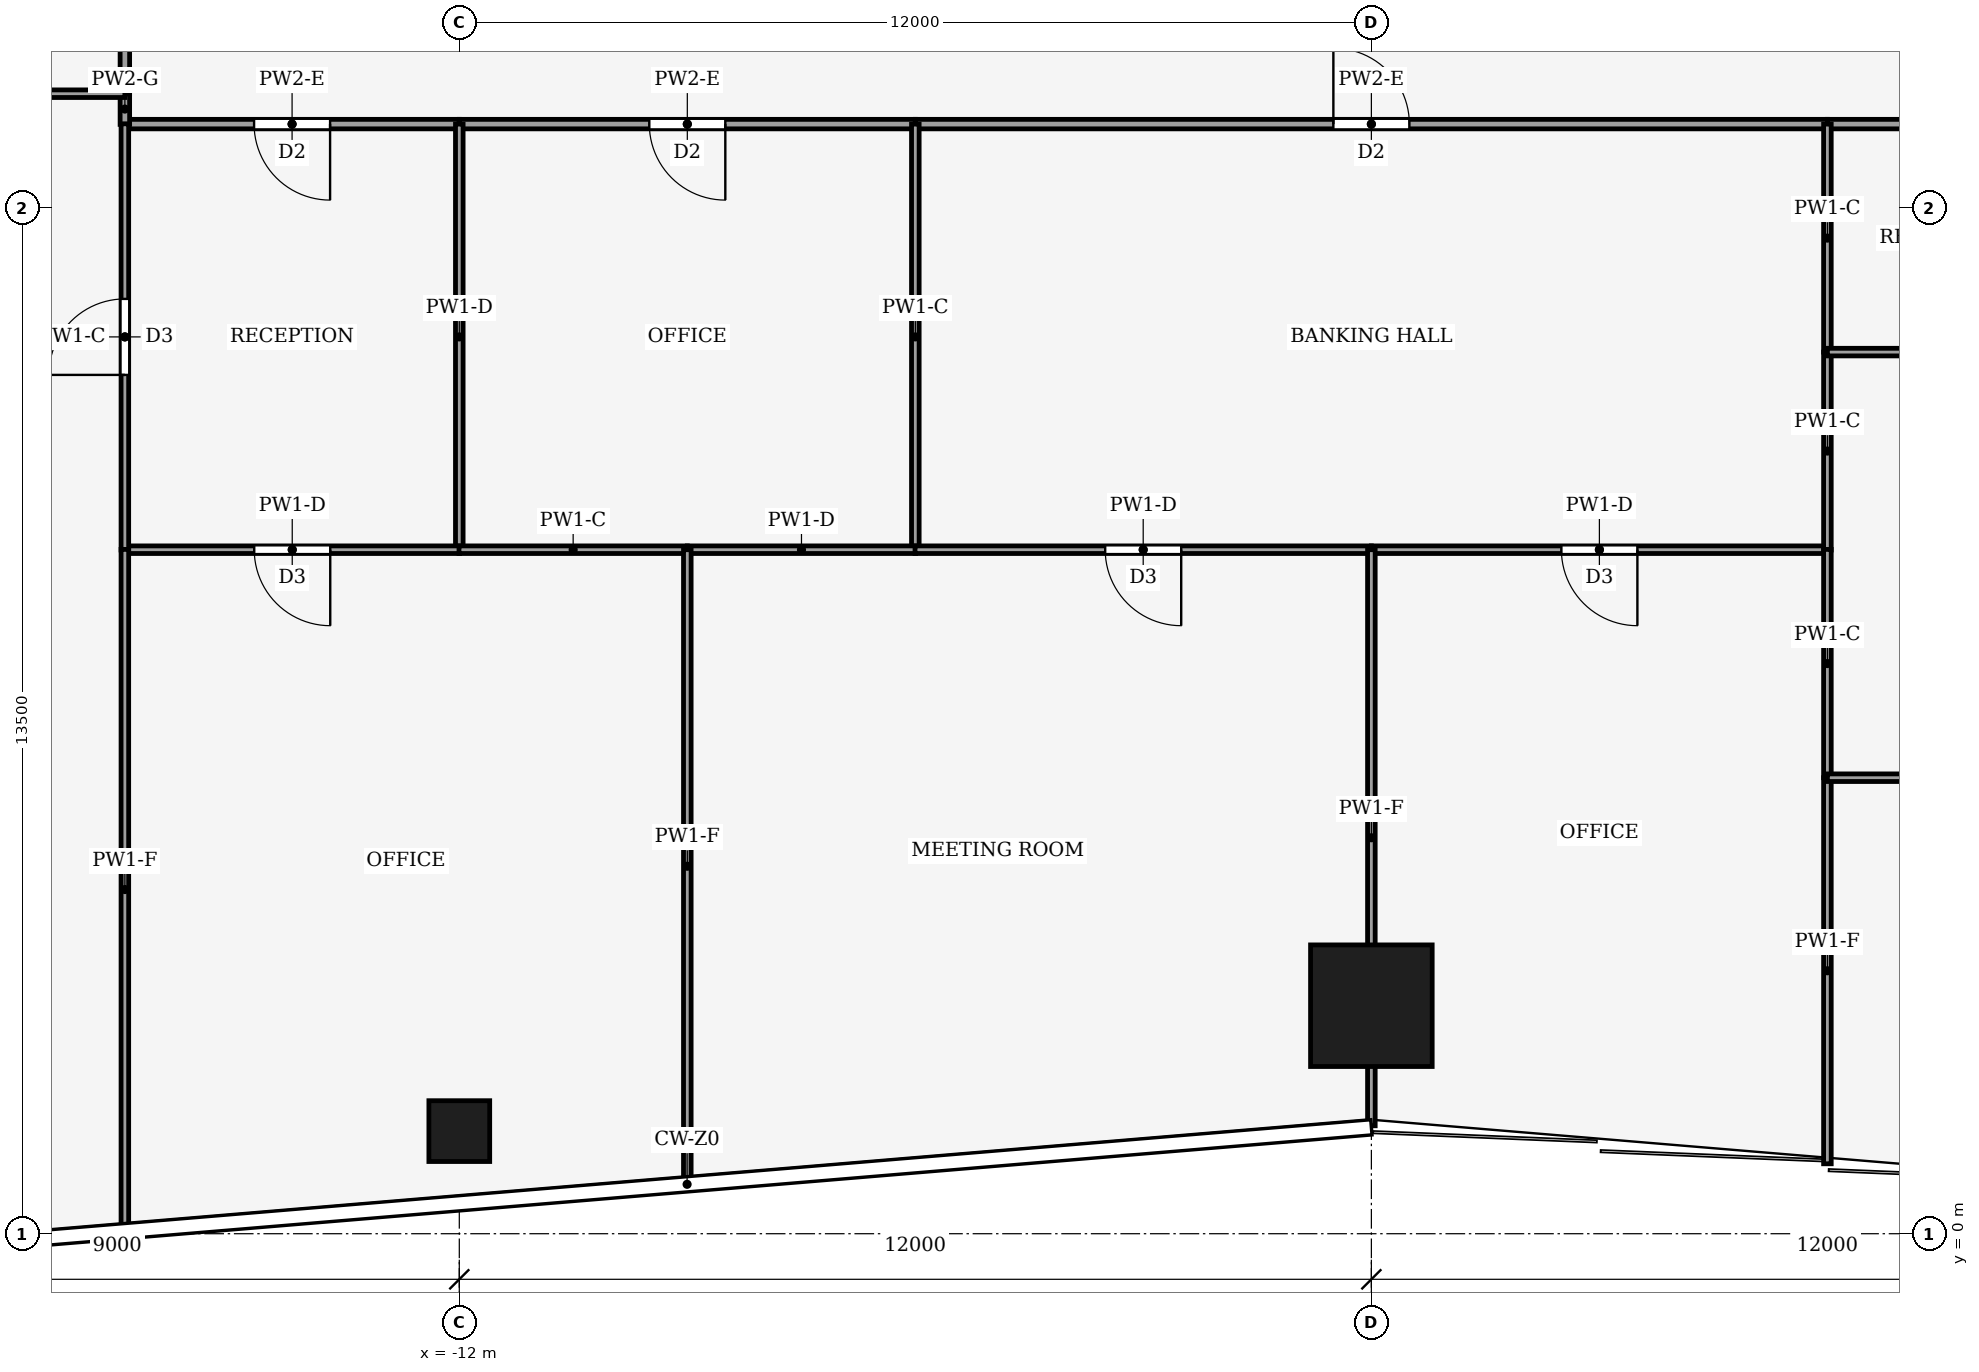
"""IFC4 building model, lengths in metres.
Left out: names, types, materials, properties, quantities, classifications, styles, units other than length and angle.
Written with IfcOpenShell. Run it as: python <this file> out.ifc"""

import sys

from ifc_helpers import new_model, si_unit, direction, frame, frame_2d, origin, origin_2d, place, context, subcontext, project, spatial, rectangle, hollow_rectangle, extrude, element, fill, save


model = new_model("IFC4")
c1 = context("Model", 3, precision=1e-05, world=origin(), true_north=direction((0.0, 1.0)))
c2 = subcontext(c1, "Body", "Model", "MODEL_VIEW")
j1 = project(units=[si_unit("LENGTHUNIT", "METRE"), si_unit("PLANEANGLEUNIT", "RADIAN")], contexts=[c1])
p1 = place(None, origin())
s1 = spatial("IfcSite", under=j1, at=p1, CompositionType="ELEMENT")
p2 = place(p1, origin())
s2 = spatial("IfcBuilding", under=s1, at=p2, CompositionType="ELEMENT")
p3 = place(p2, frame((0.0, 0.0, 22.0)))
s3 = spatial("IfcBuildingStorey", under=s2, at=p3, CompositionType="ELEMENT", Elevation=22.0)
p4 = place(p3, frame((0.0, 3.0, 0.0), z_axis=(0.0, 0.0, 1.0), x_axis=(1.0, 0.0, 0.0)))
e1 = element("IfcColumn", 1, at=p4, inside=s3, PredefinedType="COLUMN", context=c2, shape_type="SweptSolid", body=[
    extrude(hollow_rectangle(XDim=1.6, YDim=1.6, WallThickness=0.09, at=origin_2d()), origin(), (0.0, 0.0, 1.0), 4.0),
])
p5 = place(p3, frame((-12.0, 1.35, 0.0), z_axis=(0.0, 0.0, 1.0), x_axis=(1.0, 0.0, 0.0)))
e2 = element("IfcColumn", 2, at=p5, inside=s3, PredefinedType="COLUMN", context=c2, shape_type="SweptSolid", body=[
    extrude(hollow_rectangle(XDim=0.8, YDim=0.8, WallThickness=0.04, at=origin_2d()), origin(), (0.0, 0.0, 1.0), 4.0),
])
p6 = place(p3, frame((-12.0, 14.6, 0.0), z_axis=(0.0, 0.0, 1.0), x_axis=(-1.0, 0.0, 0.0)))
e3 = element("IfcWall", 3, at=p6, inside=s3, PredefinedType="PARTITIONING", context=c2, shape_type="SweptSolid", body=[
    extrude(rectangle(XDim=4.4, YDim=0.125, at=frame_2d((2.2, 0.0))), origin(), (0.0, 0.0, 1.0), 3.29),
])
p7 = place(p6, frame((1.7, 0.0, 0.0)))
e4 = element("IfcOpeningElement", 4, at=p7, cuts=e3, PredefinedType="OPENING", context=c2, shape_type="SweptSolid", body=[
    extrude(rectangle(XDim=1.0, YDim=2.1, at=frame_2d((0.5, 1.05))), frame((0.0, 0.073, 0.0), z_axis=(0.0, -1.0, 0.0), x_axis=(1.0, 0.0, 0.0)), (0.0, 0.0, 1.0), 0.145),
])
p8 = place(p3, frame((-6.0, 14.6, 0.0), z_axis=(0.0, 0.0, 1.0), x_axis=(-1.0, 0.0, 0.0)))
e5 = element("IfcWall", 5, at=p8, inside=s3, PredefinedType="PARTITIONING", context=c2, shape_type="SweptSolid", body=[
    extrude(rectangle(XDim=6.0, YDim=0.125, at=frame_2d((3.0, 0.0))), origin(), (0.0, 0.0, 1.0), 3.29),
])
p9 = place(p8, frame((2.5, 0.0, 0.0)))
e6 = element("IfcOpeningElement", 6, at=p9, cuts=e5, PredefinedType="OPENING", context=c2, shape_type="SweptSolid", body=[
    extrude(rectangle(XDim=1.0, YDim=2.1, at=frame_2d((0.5, 1.05))), frame((0.0, 0.073, 0.0), z_axis=(0.0, -1.0, 0.0), x_axis=(1.0, 0.0, 0.0)), (0.0, 0.0, 1.0), 0.145),
])
p10 = place(p3, frame((-6.0, 14.6, 0.0), z_axis=(0.0, 0.0, 1.0), x_axis=(1.0, 0.0, 0.0)))
e7 = element("IfcWall", 7, at=p10, inside=s3, PredefinedType="PARTITIONING", context=c2, shape_type="SweptSolid", body=[
    extrude(rectangle(XDim=12.0, YDim=0.125, at=frame_2d((6.0, 0.0))), origin(), (0.0, 0.0, 1.0), 3.29),
])
p11 = place(p10, frame((5.5, 0.0, 0.0)))
e8 = element("IfcOpeningElement", 8, at=p11, cuts=e7, PredefinedType="OPENING", context=c2, shape_type="SweptSolid", body=[
    extrude(rectangle(XDim=1.0, YDim=2.1, at=frame_2d((0.5, 1.05))), frame((0.0, 0.073, 0.0), z_axis=(0.0, -1.0, 0.0), x_axis=(1.0, 0.0, 0.0)), (0.0, 0.0, 1.0), 0.145),
])
p12 = place(p3, frame((9.0, 14.6, 0.0), z_axis=(0.0, 0.0, 1.0), x_axis=(-1.0, 0.0, 0.0)))
e9 = element("IfcWall", 9, at=p12, inside=s3, PredefinedType="PARTITIONING", context=c2, shape_type="SweptSolid", body=[
    extrude(rectangle(XDim=3.0, YDim=0.125, at=frame_2d((1.5, 0.0))), origin(), (0.0, 0.0, 1.0), 3.29),
])
p13 = place(p12, frame((1.0, 0.0, 0.0)))
e10 = element("IfcOpeningElement", 10, at=p13, cuts=e9, PredefinedType="OPENING", context=c2, shape_type="SweptSolid", body=[
    extrude(rectangle(XDim=1.0, YDim=2.1, at=frame_2d((0.5, 1.05))), frame((0.0, 0.073, 0.0), z_axis=(0.0, -1.0, 0.0), x_axis=(1.0, 0.0, 0.0)), (0.0, 0.0, 1.0), 0.145),
])
p14 = place(p3, frame((-16.4, 15.0, 0.0), z_axis=(0.0, 0.0, 1.0), x_axis=(0.0, -1.0, 0.0)))
e11 = element("IfcWall", 11, at=p14, inside=s3, PredefinedType="PARTITIONING", context=c2, shape_type="SweptSolid", body=[
    extrude(rectangle(XDim=0.404, YDim=0.125, at=frame_2d((0.202, 0.0))), origin(), (0.0, 0.0, 1.0), 3.87),
])
p15 = place(p3, frame((-16.4, 15.0, 0.0), z_axis=(0.0, 0.0, 1.0), x_axis=(0.0, 1.0, 0.0)))
e12 = element("IfcWall", 12, at=p15, inside=s3, PredefinedType="PARTITIONING", context=c2, shape_type="SweptSolid", body=[
    extrude(rectangle(XDim=3.0, YDim=0.125, at=frame_2d((1.5, 0.0))), origin(), (0.0, 0.0, 1.0), 3.14),
])
p16 = place(p15, frame((1.45, 0.0, 0.0)))
e13 = element("IfcOpeningElement", 13, at=p16, cuts=e12, PredefinedType="OPENING", context=c2, shape_type="SweptSolid", body=[
    extrude(rectangle(XDim=0.9, YDim=2.1, at=frame_2d((0.45, 1.05))), frame((0.0, 0.073, 0.0), z_axis=(0.0, -1.0, 0.0), x_axis=(1.0, 0.0, 0.0)), (0.0, 0.0, 1.0), 0.145),
])
p17 = place(p3, frame((-12.0, 9.0, 0.0), z_axis=(0.0, 0.0, 1.0), x_axis=(0.0, 1.0, 0.0)))
e14 = element("IfcWall", 14, at=p17, inside=s3, PredefinedType="PARTITIONING", context=c2, shape_type="SweptSolid", body=[
    extrude(rectangle(XDim=5.6, YDim=0.1, at=frame_2d((2.8, 0.0))), origin(), (0.0, 0.0, 1.0), 3.29),
])
p18 = place(p3, frame((-11.996, 9.0, 0.0), z_axis=(0.0, 0.0, 1.0), x_axis=(-1.0, 0.0, 0.0)))
e15 = element("IfcWall", 15, at=p18, inside=s3, PredefinedType="PARTITIONING", context=c2, shape_type="SweptSolid", body=[
    extrude(rectangle(XDim=4.404, YDim=0.1, at=frame_2d((2.202, 0.0))), origin(), (0.0, 0.0, 1.0), 3.29),
])
p19 = place(p18, frame((1.702, 0.0, 0.0)))
e16 = element("IfcOpeningElement", 16, at=p19, cuts=e15, PredefinedType="OPENING", context=c2, shape_type="SweptSolid", body=[
    extrude(rectangle(XDim=1.0, YDim=2.1, at=frame_2d((0.5, 1.05))), frame((0.0, 0.06, 0.0), z_axis=(0.0, -1.0, 0.0), x_axis=(1.0, 0.0, 0.0)), (0.0, 0.0, 1.0), 0.12),
])
p20 = place(p3, frame((-16.4, 8.996, 0.0), z_axis=(0.0, 0.0, 1.0), x_axis=(0.0, 1.0, 0.0)))
e17 = element("IfcWall", 17, at=p20, inside=s3, PredefinedType="PARTITIONING", context=c2, shape_type="SweptSolid", body=[
    extrude(rectangle(XDim=5.608, YDim=0.1, at=frame_2d((2.804, 0.0))), origin(), (0.0, 0.0, 1.0), 3.87),
])
p21 = place(p20, frame((2.304, 0.0, 0.0)))
e18 = element("IfcOpeningElement", 18, at=p21, cuts=e17, PredefinedType="OPENING", context=c2, shape_type="SweptSolid", body=[
    extrude(rectangle(XDim=1.0, YDim=2.1, at=frame_2d((0.5, 1.05))), frame((0.0, 0.06, 0.0), z_axis=(0.0, -1.0, 0.0), x_axis=(1.0, 0.0, 0.0)), (0.0, 0.0, 1.0), 0.12),
])
p22 = place(p3, frame((-6.0, 9.0, 0.0), z_axis=(0.0, 0.0, 1.0), x_axis=(0.0, 1.0, 0.0)))
e19 = element("IfcWall", 19, at=p22, inside=s3, PredefinedType="PARTITIONING", context=c2, shape_type="SweptSolid", body=[
    extrude(rectangle(XDim=5.6, YDim=0.1, at=frame_2d((2.8, 0.0))), origin(), (0.0, 0.0, 1.0), 3.87),
])
p23 = place(p3, frame((-12.004, 9.0, 0.0), z_axis=(0.0, 0.0, 1.0), x_axis=(1.0, 0.0, 0.0)))
e20 = element("IfcWall", 20, at=p23, inside=s3, PredefinedType="PARTITIONING", context=c2, shape_type="SweptSolid", body=[
    extrude(rectangle(XDim=3.004, YDim=0.1, at=frame_2d((1.502, 0.0))), origin(), (0.0, 0.0, 1.0), 3.87),
])
p24 = place(p3, frame((-9.0, 9.0, 0.0), z_axis=(0.0, 0.0, 1.0), x_axis=(1.0, 0.0, 0.0)))
e21 = element("IfcWall", 21, at=p24, inside=s3, PredefinedType="PARTITIONING", context=c2, shape_type="SweptSolid", body=[
    extrude(rectangle(XDim=3.004, YDim=0.1, at=frame_2d((1.502, 0.0))), origin(), (0.0, 0.0, 1.0), 3.29),
])
p25 = place(p3, frame((0.0, 9.0, 0.0), z_axis=(0.0, 0.0, 1.0), x_axis=(-1.0, 0.0, 0.0)))
e22 = element("IfcWall", 22, at=p25, inside=s3, PredefinedType="PARTITIONING", context=c2, shape_type="SweptSolid", body=[
    extrude(rectangle(XDim=6.004, YDim=0.1, at=frame_2d((3.002, 0.0))), origin(), (0.0, 0.0, 1.0), 3.29),
])
p26 = place(p25, frame((2.502, 0.0, 0.0)))
e23 = element("IfcOpeningElement", 23, at=p26, cuts=e22, PredefinedType="OPENING", context=c2, shape_type="SweptSolid", body=[
    extrude(rectangle(XDim=1.0, YDim=2.1, at=frame_2d((0.5, 1.05))), frame((0.0, 0.06, 0.0), z_axis=(0.0, -1.0, 0.0), x_axis=(1.0, 0.0, 0.0)), (0.0, 0.0, 1.0), 0.12),
])
p27 = place(p3, frame((6.0, 9.0, 0.0), z_axis=(0.0, 0.0, 1.0), x_axis=(-1.0, 0.0, 0.0)))
e24 = element("IfcWall", 24, at=p27, inside=s3, PredefinedType="PARTITIONING", context=c2, shape_type="SweptSolid", body=[
    extrude(rectangle(XDim=6.0, YDim=0.1, at=frame_2d((3.0, 0.0))), origin(), (0.0, 0.0, 1.0), 3.29),
])
p28 = place(p27, frame((2.5, 0.0, 0.0)))
e25 = element("IfcOpeningElement", 25, at=p28, cuts=e24, PredefinedType="OPENING", context=c2, shape_type="SweptSolid", body=[
    extrude(rectangle(XDim=1.0, YDim=2.1, at=frame_2d((0.5, 1.05))), frame((0.0, 0.06, 0.0), z_axis=(0.0, -1.0, 0.0), x_axis=(1.0, 0.0, 0.0)), (0.0, 0.0, 1.0), 0.12),
])
p29 = place(p3, frame((6.0, 11.6, 0.0), z_axis=(0.0, 0.0, 1.0), x_axis=(0.0, 1.0, 0.0)))
e26 = element("IfcWall", 26, at=p29, inside=s3, PredefinedType="PARTITIONING", context=c2, shape_type="SweptSolid", body=[
    extrude(rectangle(XDim=3.0, YDim=0.1, at=frame_2d((1.5, 0.0))), origin(), (0.0, 0.0, 1.0), 3.87),
])
p30 = place(p3, frame((6.0, 8.996, 0.0), z_axis=(0.0, 0.0, 1.0), x_axis=(0.0, 1.0, 0.0)))
e27 = element("IfcWall", 27, at=p30, inside=s3, PredefinedType="PARTITIONING", context=c2, shape_type="SweptSolid", body=[
    extrude(rectangle(XDim=2.604, YDim=0.1, at=frame_2d((1.302, 0.0))), origin(), (0.0, 0.0, 1.0), 3.87),
])
p31 = place(p3, frame((-9.0, 0.67, 0.0), z_axis=(0.0, 0.0, 1.0), x_axis=(0.0, 1.0, 0.0)))
e28 = element("IfcWall", 28, at=p31, inside=s3, PredefinedType="PARTITIONING", context=c2, shape_type="SweptSolid", body=[
    extrude(rectangle(XDim=8.33, YDim=0.1, at=frame_2d((4.165, 0.0))), origin(), (0.0, 0.0, 1.0), 3.04),
])
p32 = place(p3, frame((-16.4, 9.004, 0.0), z_axis=(0.0, 0.0, 1.0), x_axis=(0.0, -1.0, 0.0)))
e29 = element("IfcWall", 29, at=p32, inside=s3, PredefinedType="PARTITIONING", context=c2, shape_type="SweptSolid", body=[
    extrude(rectangle(XDim=8.951, YDim=0.1, at=frame_2d((4.475, 0.0))), origin(), (0.0, 0.0, 1.0), 3.04),
])
p33 = place(p3, frame((0.0, 1.42, 0.0), z_axis=(0.0, 0.0, 1.0), x_axis=(0.0, 1.0, 0.0)))
e30 = element("IfcWall", 30, at=p33, inside=s3, PredefinedType="PARTITIONING", context=c2, shape_type="SweptSolid", body=[
    extrude(rectangle(XDim=7.58, YDim=0.1, at=frame_2d((3.79, 0.0))), origin(), (0.0, 0.0, 1.0), 3.04),
])
p34 = place(p3, frame((6.0, 6.0, 0.0), z_axis=(0.0, 0.0, 1.0), x_axis=(0.0, 1.0, 0.0)))
e31 = element("IfcWall", 31, at=p34, inside=s3, PredefinedType="PARTITIONING", context=c2, shape_type="SweptSolid", body=[
    extrude(rectangle(XDim=3.004, YDim=0.1, at=frame_2d((1.502, 0.0))), origin(), (0.0, 0.0, 1.0), 3.87),
])
p35 = place(p3, frame((6.0, 0.92, 0.0), z_axis=(0.0, 0.0, 1.0), x_axis=(0.0, 1.0, 0.0)))
e32 = element("IfcWall", 32, at=p35, inside=s3, PredefinedType="PARTITIONING", context=c2, shape_type="SweptSolid", body=[
    extrude(rectangle(XDim=5.08, YDim=0.1, at=frame_2d((2.54, 0.0))), origin(), (0.0, 0.0, 1.0), 3.04),
])
p36 = place(p3, frame((9.004, 11.6, 0.0), z_axis=(0.0, 0.0, 1.0), x_axis=(-1.0, 0.0, 0.0)))
e33 = element("IfcWall", 33, at=p36, inside=s3, PredefinedType="PARTITIONING", context=c2, shape_type="SweptSolid", body=[
    extrude(rectangle(XDim=3.004, YDim=0.1, at=frame_2d((1.502, 0.0))), origin(), (0.0, 0.0, 1.0), 3.29),
])
p37 = place(p36, frame((1.002, 0.0, 0.0)))
e34 = element("IfcOpeningElement", 34, at=p37, cuts=e33, PredefinedType="OPENING", context=c2, shape_type="SweptSolid", body=[
    extrude(rectangle(XDim=1.0, YDim=2.1, at=frame_2d((0.5, 1.05))), frame((0.0, 0.06, 0.0), z_axis=(0.0, -1.0, 0.0), x_axis=(1.0, 0.0, 0.0)), (0.0, 0.0, 1.0), 0.12),
])
p38 = place(p3, frame((12.0, 6.0, 0.0), z_axis=(0.0, 0.0, 1.0), x_axis=(-1.0, 0.0, 0.0)))
e35 = element("IfcWall", 35, at=p38, inside=s3, PredefinedType="PARTITIONING", context=c2, shape_type="SweptSolid", body=[
    extrude(rectangle(XDim=6.0, YDim=0.1, at=frame_2d((3.0, 0.0))), origin(), (0.0, 0.0, 1.0), 3.29),
])
p39 = place(p38, frame((2.5, 0.0, 0.0)))
e36 = element("IfcOpeningElement", 36, at=p39, cuts=e35, PredefinedType="OPENING", context=c2, shape_type="SweptSolid", body=[
    extrude(rectangle(XDim=1.0, YDim=2.1, at=frame_2d((0.5, 1.05))), frame((0.0, 0.06, 0.0), z_axis=(0.0, -1.0, 0.0), x_axis=(1.0, 0.0, 0.0)), (0.0, 0.0, 1.0), 0.12),
])
p40 = place(p3, frame((-16.4, 15.0, 0.0), z_axis=(0.0, 0.0, 1.0), x_axis=(-1.0, 0.0, 0.0)))
e37 = element("IfcWall", 37, at=p40, inside=s3, PredefinedType="PARTITIONING", context=c2, shape_type="SweptSolid", body=[
    extrude(rectangle(XDim=6.862, YDim=0.1, at=frame_2d((3.431, 0.0))), origin(), (0.0, 0.0, 1.0), 3.04),
])
p41 = place(p7, origin())
e38 = element("IfcDoor", 38, at=p41, inside=s3, OperationType="SINGLE_SWING_LEFT", PredefinedType="DOOR", context=c2, shape_type="SweptSolid", body=[
    extrude(rectangle(XDim=1.0, YDim=2.1, at=frame_2d((0.5, 1.05))), frame((0.0, 0.025, 0.0), z_axis=(0.0, -1.0, 0.0), x_axis=(1.0, 0.0, 0.0)), (0.0, 0.0, 1.0), 0.05),
])
fill(e4, e38)
p42 = place(p9, origin())
e39 = element("IfcDoor", 39, at=p42, inside=s3, OperationType="SINGLE_SWING_RIGHT", PredefinedType="DOOR", context=c2, shape_type="SweptSolid", body=[
    extrude(rectangle(XDim=1.0, YDim=2.1, at=frame_2d((0.5, 1.05))), frame((0.0, 0.025, 0.0), z_axis=(0.0, -1.0, 0.0), x_axis=(1.0, 0.0, 0.0)), (0.0, 0.0, 1.0), 0.05),
])
fill(e6, e39)
p43 = place(p11, origin())
e40 = element("IfcDoor", 40, at=p43, inside=s3, OperationType="SINGLE_SWING_LEFT", PredefinedType="DOOR", context=c2, shape_type="SweptSolid", body=[
    extrude(rectangle(XDim=1.0, YDim=2.1, at=frame_2d((0.5, 1.05))), frame((0.0, 0.025, 0.0), z_axis=(0.0, -1.0, 0.0), x_axis=(1.0, 0.0, 0.0)), (0.0, 0.0, 1.0), 0.05),
])
fill(e8, e40)
p44 = place(p19, origin())
e41 = element("IfcDoor", 41, at=p44, inside=s3, OperationType="SINGLE_SWING_LEFT", PredefinedType="DOOR", context=c2, shape_type="SweptSolid", body=[
    extrude(rectangle(XDim=1.0, YDim=2.1, at=frame_2d((0.5, 1.05))), frame((0.0, 0.025, 0.0), z_axis=(0.0, -1.0, 0.0), x_axis=(1.0, 0.0, 0.0)), (0.0, 0.0, 1.0), 0.05),
])
fill(e16, e41)
p45 = place(p21, origin())
e42 = element("IfcDoor", 42, at=p45, inside=s3, OperationType="SINGLE_SWING_RIGHT", PredefinedType="DOOR", context=c2, shape_type="SweptSolid", body=[
    extrude(rectangle(XDim=1.0, YDim=2.1, at=frame_2d((0.5, 1.05))), frame((0.0, 0.025, 0.0), z_axis=(0.0, -1.0, 0.0), x_axis=(1.0, 0.0, 0.0)), (0.0, 0.0, 1.0), 0.05),
])
fill(e18, e42)
p46 = place(p26, origin())
e43 = element("IfcDoor", 43, at=p46, inside=s3, OperationType="SINGLE_SWING_LEFT", PredefinedType="DOOR", context=c2, shape_type="SweptSolid", body=[
    extrude(rectangle(XDim=1.0, YDim=2.1, at=frame_2d((0.5, 1.05))), frame((0.0, 0.025, 0.0), z_axis=(0.0, -1.0, 0.0), x_axis=(1.0, 0.0, 0.0)), (0.0, 0.0, 1.0), 0.05),
])
fill(e23, e43)
p47 = place(p28, origin())
e44 = element("IfcDoor", 44, at=p47, inside=s3, OperationType="SINGLE_SWING_RIGHT", PredefinedType="DOOR", context=c2, shape_type="SweptSolid", body=[
    extrude(rectangle(XDim=1.0, YDim=2.1, at=frame_2d((0.5, 1.05))), frame((0.0, 0.025, 0.0), z_axis=(0.0, -1.0, 0.0), x_axis=(1.0, 0.0, 0.0)), (0.0, 0.0, 1.0), 0.05),
])
fill(e25, e44)
save(model, sys.argv[1])
